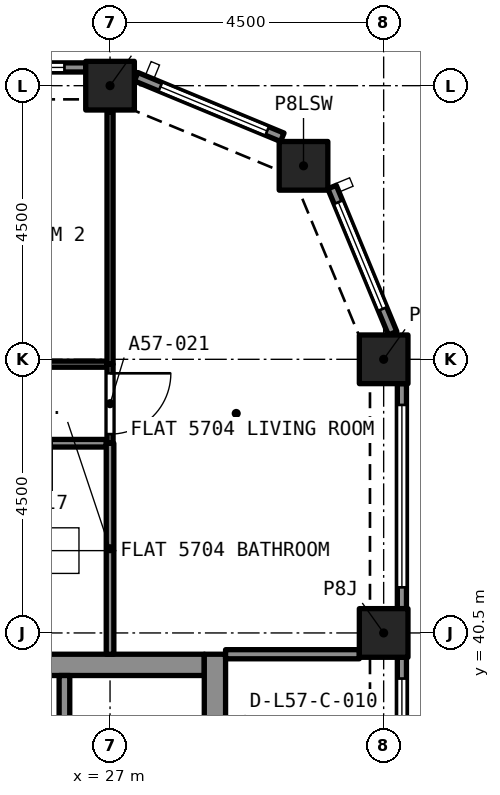
"""IFC4 building model, lengths in metres.
Left out: names, types, materials, properties, quantities, classifications, styles, units other than length and angle.
Written with IfcOpenShell. Run it as: python <this file> out.ifc"""

import sys

from ifc_helpers import new_model, si_unit, direction, frame, frame_2d, origin, origin_2d, place, context, subcontext, project, spatial, rectangle, extrude, element, fill, save


model = new_model("IFC4")
c1 = context("Model", 3, precision=1e-05, world=origin(), true_north=direction((0.0, 1.0)))
c2 = subcontext(c1, "Body", "Model", "MODEL_VIEW")
j1 = project(units=[si_unit("LENGTHUNIT", "METRE"), si_unit("PLANEANGLEUNIT", "RADIAN")], contexts=[c1])
p1 = place(None, origin())
s1 = spatial("IfcSite", under=j1, at=p1, CompositionType="ELEMENT")
p2 = place(p1, origin())
s2 = spatial("IfcBuilding", under=s1, at=p2, CompositionType="ELEMENT")
p3 = place(p2, frame((0.0, 0.0, 206.895)))
s3 = spatial("IfcBuildingStorey", under=s2, at=p3, CompositionType="ELEMENT", Elevation=206.895)
for number, where, z_axis, x_axis in (
    (1, (31.5, 40.5, 0.0), (0.0, 0.0, 1.0), (1.0, 0.0, 0.0)),
    (2, (31.5, 45.0, 0.0), (0.0, 0.0, 1.0), (1.0, 0.0, 0.0)),
    (3, (30.182, 48.182, 0.0), (0.0, 0.0, 1.0), (1.0, 0.0, 0.0)),
    (4, (27.0, 49.5, 0.0), (0.0, 0.0, 1.0), (1.0, 0.0, 0.0)),
):
    element("IfcColumn", number, at=place(p3, frame(where, z_axis=z_axis, x_axis=x_axis)), inside=s3, PredefinedType="COLUMN", context=c2, shape_type="SweptSolid", body=[
        extrude(rectangle(XDim=0.8, YDim=0.8, at=origin_2d()), origin(), (0.0, 0.0, 1.0), 3.2),
    ])
p4 = place(p3, frame((20.95, 39.975, 0.0), z_axis=(0.0, 0.0, 1.0), x_axis=(1.0, 0.0, 0.0)))
e5 = element("IfcWall", 5, at=p4, inside=s3, PredefinedType="SOLIDWALL", context=c2, shape_type="SweptSolid", body=[
    extrude(rectangle(XDim=7.6, YDim=0.35, at=frame_2d((3.8, 0.0))), origin(), (0.0, 0.0, 1.0), 3.2),
])
p5 = place(p3, frame((28.725, 27.35, 0.0), z_axis=(0.0, 0.0, 1.0), x_axis=(0.0, 1.0, 0.0)))
e6 = element("IfcWall", 6, at=p5, inside=s3, PredefinedType="SOLIDWALL", context=c2, shape_type="SweptSolid", body=[
    extrude(rectangle(XDim=12.8, YDim=0.35, at=frame_2d((6.4, 0.0))), origin(), (0.0, 0.0, 1.0), 3.2),
])
p6 = place(p5, frame((8.6, 0.0, 0.0)))
e7 = element("IfcOpeningElement", 7, at=p6, cuts=e6, PredefinedType="OPENING", context=c2, shape_type="SweptSolid", body=[
    extrude(rectangle(XDim=1.2, YDim=2.1, at=frame_2d((0.6, 1.05))), frame((0.0, 0.185, 0.0), z_axis=(0.0, -1.0, 0.0), x_axis=(1.0, 0.0, 0.0)), (0.0, 0.0, 1.0), 0.37),
])
p7 = place(p3, frame((31.8, 40.1, 0.0), z_axis=(0.0, 0.0, 1.0), x_axis=(0.0, -1.0, 0.0)))
e8 = element("IfcWall", 8, at=p7, inside=s3, PredefinedType="SOLIDWALL", context=c2, shape_type="SweptSolid", body=[
    extrude(rectangle(XDim=3.7, YDim=0.15, at=frame_2d((1.85, 0.0))), origin(), (0.0, 0.0, 1.0), 3.2),
])
p8 = place(p7, frame((0.35, 0.0, 0.45)))
e9 = element("IfcOpeningElement", 9, at=p8, cuts=e8, PredefinedType="OPENING", context=c2, shape_type="SweptSolid", body=[
    extrude(rectangle(XDim=3.0, YDim=1.95, at=frame_2d((1.5, 0.975))), frame((0.0, 0.085, 0.0), z_axis=(0.0, -1.0, 0.0), x_axis=(1.0, 0.0, 0.0)), (0.0, 0.0, 1.0), 0.17),
])
p9 = place(p3, frame((31.8, 44.6, 0.0), z_axis=(0.0, 0.0, 1.0), x_axis=(0.0, -1.0, 0.0)))
e10 = element("IfcWall", 10, at=p9, inside=s3, PredefinedType="SOLIDWALL", context=c2, shape_type="SweptSolid", body=[
    extrude(rectangle(XDim=3.7, YDim=0.15, at=frame_2d((1.85, 0.0))), origin(), (0.0, 0.0, 1.0), 3.2),
])
p10 = place(p9, frame((0.35, 0.0, 0.45)))
e11 = element("IfcOpeningElement", 11, at=p10, cuts=e10, PredefinedType="OPENING", context=c2, shape_type="SweptSolid", body=[
    extrude(rectangle(XDim=3.0, YDim=1.95, at=frame_2d((1.5, 0.975))), frame((0.0, 0.085, 0.0), z_axis=(0.0, -1.0, 0.0), x_axis=(1.0, 0.0, 0.0)), (0.0, 0.0, 1.0), 0.17),
])
p11 = place(p3, frame((30.651, 47.833, 0.0), z_axis=(0.0, 0.0, 1.0), x_axis=(0.382669406082, -0.923885342263, 0.0)))
e12 = element("IfcWall", 12, at=p11, inside=s3, PredefinedType="SOLIDWALL", context=c2, shape_type="SweptSolid", body=[
    extrude(rectangle(XDim=2.602, YDim=0.15, at=frame_2d((1.301, 0.0))), origin(), (0.0, 0.0, 1.0), 3.2),
])
p12 = place(p11, frame((0.27, 0.0, 0.45)))
e13 = element("IfcOpeningElement", 13, at=p12, cuts=e12, PredefinedType="OPENING", context=c2, shape_type="SweptSolid", body=[
    extrude(rectangle(XDim=1.9, YDim=1.95, at=frame_2d((0.95, 0.975))), frame((0.0, 0.085, 0.0), z_axis=(0.0, -1.0, 0.0), x_axis=(1.0, 0.0, 0.0)), (0.0, 0.0, 1.0), 0.17),
])
p13 = place(p3, frame((27.429, 49.647, 0.0), z_axis=(0.0, 0.0, 1.0), x_axis=(0.923885342263, -0.382669406082, 0.0)))
e14 = element("IfcWall", 14, at=p13, inside=s3, PredefinedType="SOLIDWALL", context=c2, shape_type="SweptSolid", body=[
    extrude(rectangle(XDim=2.602, YDim=0.15, at=frame_2d((1.301, 0.0))), origin(), (0.0, 0.0, 1.0), 3.2),
])
p14 = place(p13, frame((0.432, 0.0, 0.45)))
e15 = element("IfcOpeningElement", 15, at=p14, cuts=e14, PredefinedType="OPENING", context=c2, shape_type="SweptSolid", body=[
    extrude(rectangle(XDim=1.9, YDim=1.95, at=frame_2d((0.95, 0.975))), frame((0.0, 0.085, 0.0), z_axis=(0.0, -1.0, 0.0), x_axis=(1.0, 0.0, 0.0)), (0.0, 0.0, 1.0), 0.17),
])
p15 = place(p3, frame((22.9, 49.8, 0.0), z_axis=(0.0, 0.0, 1.0), x_axis=(1.0, 0.0, 0.0)))
e16 = element("IfcWall", 16, at=p15, inside=s3, PredefinedType="SOLIDWALL", context=c2, shape_type="SweptSolid", body=[
    extrude(rectangle(XDim=3.7, YDim=0.15, at=frame_2d((1.85, 0.0))), origin(), (0.0, 0.0, 1.0), 3.2),
])
p16 = place(p15, frame((0.35, 0.0, 0.45)))
e17 = element("IfcOpeningElement", 17, at=p16, cuts=e16, PredefinedType="OPENING", context=c2, shape_type="SweptSolid", body=[
    extrude(rectangle(XDim=3.0, YDim=1.95, at=frame_2d((1.5, 0.975))), frame((0.0, 0.085, 0.0), z_axis=(0.0, -1.0, 0.0), x_axis=(1.0, 0.0, 0.0)), (0.0, 0.0, 1.0), 0.17),
])
p17 = place(p3, frame((26.938, 43.62, 0.0), z_axis=(0.0, 0.0, 1.0), x_axis=(-1.0, 0.0, 0.0)))
e18 = element("IfcWall", 18, at=p17, inside=s3, PredefinedType="PARTITIONING", context=c2, shape_type="SweptSolid", body=[
    extrude(rectangle(XDim=2.659, YDim=0.125, at=frame_2d((1.33, 0.0))), origin(), (0.0, 0.0, 1.0), 2.75),
])
p18 = place(p17, frame((0.898, 0.0, 0.0)))
e19 = element("IfcOpeningElement", 19, at=p18, cuts=e18, PredefinedType="OPENING", context=c2, shape_type="SweptSolid", body=[
    extrude(rectangle(XDim=0.8, YDim=2.1, at=frame_2d((0.4, 1.05))), frame((0.0, 0.073, 0.0), z_axis=(0.0, -1.0, 0.0), x_axis=(1.0, 0.0, 0.0)), (0.0, 0.0, 1.0), 0.145),
])
p19 = place(p3, frame((27.0, 40.15, 0.0), z_axis=(0.0, 0.0, 1.0), x_axis=(0.0, 1.0, 0.0)))
e20 = element("IfcWall", 20, at=p19, inside=s3, PredefinedType="PARTITIONING", context=c2, shape_type="SweptSolid", body=[
    extrude(rectangle(XDim=3.47, YDim=0.125, at=frame_2d((1.735, 0.0))), origin(), (0.0, 0.0, 1.0), 2.75),
])
p20 = place(p3, frame((22.5, 44.92, 0.0), z_axis=(0.0, 0.0, 1.0), x_axis=(1.0, 0.0, 0.0)))
e21 = element("IfcWall", 21, at=p20, inside=s3, PredefinedType="PARTITIONING", context=c2, shape_type="SweptSolid", body=[
    extrude(rectangle(XDim=4.45, YDim=0.1, at=frame_2d((2.225, 0.0))), origin(), (0.0, 0.0, 1.0), 2.75),
])
p21 = place(p20, frame((1.8, 0.0, 0.0)))
e22 = element("IfcOpeningElement", 22, at=p21, cuts=e21, PredefinedType="OPENING", context=c2, shape_type="SweptSolid", body=[
    extrude(rectangle(XDim=0.9, YDim=2.1, at=frame_2d((0.45, 1.05))), frame((0.0, 0.06, 0.0), z_axis=(0.0, -1.0, 0.0), x_axis=(1.0, 0.0, 0.0)), (0.0, 0.0, 1.0), 0.12),
])
p22 = place(p3, frame((27.0, 44.92, 0.0), z_axis=(0.0, 0.0, 1.0), x_axis=(0.0, 1.0, 0.0)))
e23 = element("IfcWall", 23, at=p22, inside=s3, PredefinedType="PARTITIONING", context=c2, shape_type="SweptSolid", body=[
    extrude(rectangle(XDim=4.147, YDim=0.1, at=frame_2d((2.074, 0.0))), origin(), (0.0, 0.0, 1.0), 2.75),
])
p23 = place(p3, frame((27.0, 44.92, 0.0), z_axis=(0.0, 0.0, 1.0), x_axis=(0.0, -1.0, 0.0)))
e24 = element("IfcWall", 24, at=p23, inside=s3, PredefinedType="PARTITIONING", context=c2, shape_type="SweptSolid", body=[
    extrude(rectangle(XDim=1.3, YDim=0.1, at=frame_2d((0.65, 0.0))), origin(), (0.0, 0.0, 1.0), 2.75),
])
p24 = place(p23, frame((0.15, 0.0, 0.0)))
e25 = element("IfcOpeningElement", 25, at=p24, cuts=e24, PredefinedType="OPENING", context=c2, shape_type="SweptSolid", body=[
    extrude(rectangle(XDim=1.0, YDim=2.1, at=frame_2d((0.5, 1.05))), frame((0.0, 0.06, 0.0), z_axis=(0.0, -1.0, 0.0), x_axis=(1.0, 0.0, 0.0)), (0.0, 0.0, 1.0), 0.12),
])
p25 = place(p3, frame((28.9, 40.15, 0.0), z_axis=(0.0, 0.0, 1.0), x_axis=(1.0, 0.0, 0.0)))
e26 = element("IfcWall", 26, at=p25, inside=s3, PredefinedType="PARTITIONING", context=c2, shape_type="SweptSolid", body=[
    extrude(rectangle(XDim=2.2, YDim=0.15, at=frame_2d((1.1, 0.0))), origin(), (0.0, 0.0, 1.0), 2.75),
])
p26 = place(p3, frame((26.25, 37.5, 0.0), z_axis=(0.0, 0.0, 1.0), x_axis=(0.0, 1.0, 0.0)))
e27 = element("IfcWall", 27, at=p26, inside=s3, PredefinedType="SOLIDWALL", context=c2, shape_type="SweptSolid", body=[
    extrude(rectangle(XDim=2.3, YDim=0.175, at=frame_2d((1.15, 0.0))), origin(), (0.0, 0.0, 1.0), 2.9),
])
p27 = place(p8, origin())
e28 = element("IfcWindow", 28, at=p27, inside=s3, PartitioningType="SINGLE_PANEL", PredefinedType="WINDOW", context=c2, shape_type="SweptSolid", body=[
    extrude(rectangle(XDim=3.0, YDim=1.95, at=frame_2d((1.5, 0.975))), frame((0.0, 0.03, 0.0), z_axis=(0.0, -1.0, 0.0), x_axis=(1.0, 0.0, 0.0)), (0.0, 0.0, 1.0), 0.06),
])
fill(e9, e28)
p28 = place(p10, origin())
e29 = element("IfcWindow", 29, at=p28, inside=s3, PartitioningType="SINGLE_PANEL", PredefinedType="WINDOW", context=c2, shape_type="SweptSolid", body=[
    extrude(rectangle(XDim=3.0, YDim=1.95, at=frame_2d((1.5, 0.975))), frame((0.0, 0.03, 0.0), z_axis=(0.0, -1.0, 0.0), x_axis=(1.0, 0.0, 0.0)), (0.0, 0.0, 1.0), 0.06),
])
fill(e11, e29)
p29 = place(p12, origin())
e30 = element("IfcWindow", 30, at=p29, inside=s3, PartitioningType="SINGLE_PANEL", PredefinedType="WINDOW", context=c2, shape_type="SweptSolid", body=[
    extrude(rectangle(XDim=1.9, YDim=1.95, at=frame_2d((0.95, 0.975))), frame((0.0, 0.03, 0.0), z_axis=(0.0, -1.0, 0.0), x_axis=(1.0, 0.0, 0.0)), (0.0, 0.0, 1.0), 0.06),
])
fill(e13, e30)
p30 = place(p14, origin())
e31 = element("IfcWindow", 31, at=p30, inside=s3, PartitioningType="SINGLE_PANEL", PredefinedType="WINDOW", context=c2, shape_type="SweptSolid", body=[
    extrude(rectangle(XDim=1.9, YDim=1.95, at=frame_2d((0.95, 0.975))), frame((0.0, 0.03, 0.0), z_axis=(0.0, -1.0, 0.0), x_axis=(1.0, 0.0, 0.0)), (0.0, 0.0, 1.0), 0.06),
])
fill(e15, e31)
p31 = place(p16, origin())
e32 = element("IfcWindow", 32, at=p31, inside=s3, PartitioningType="SINGLE_PANEL", PredefinedType="WINDOW", context=c2, shape_type="SweptSolid", body=[
    extrude(rectangle(XDim=3.0, YDim=1.95, at=frame_2d((1.5, 0.975))), frame((0.0, 0.03, 0.0), z_axis=(0.0, -1.0, 0.0), x_axis=(1.0, 0.0, 0.0)), (0.0, 0.0, 1.0), 0.06),
])
fill(e17, e32)
p32 = place(p24, origin())
e33 = element("IfcDoor", 33, at=p32, inside=s3, OperationType="SINGLE_SWING_LEFT", PredefinedType="DOOR", context=c2, shape_type="SweptSolid", body=[
    extrude(rectangle(XDim=1.0, YDim=2.1, at=frame_2d((0.5, 1.05))), frame((0.0, 0.025, 0.0), z_axis=(0.0, -1.0, 0.0), x_axis=(1.0, 0.0, 0.0)), (0.0, 0.0, 1.0), 0.05),
])
fill(e25, e33)
save(model, sys.argv[1])
